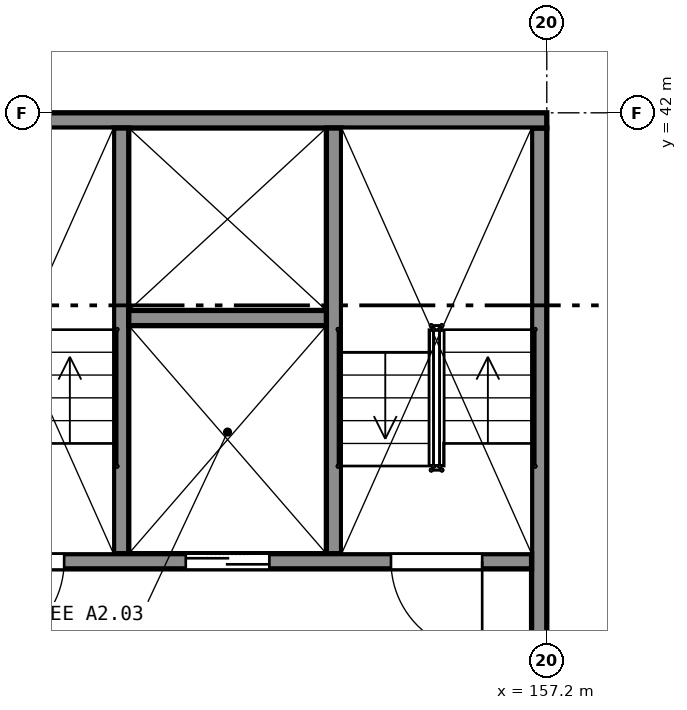
"""IFC4 building model, lengths in metres.
Left out: names, types, materials, properties, quantities, classifications, styles, units other than length and angle.
Written with IfcOpenShell. Run it as: python <this file> out.ifc"""

import sys

from ifc_helpers import new_model, si_unit, direction, frame, frame_2d, origin, place, context, subcontext, project, spatial, rectangle, extrude, element, fill, save


model = new_model("IFC4")
c1 = context("Model", 3, precision=1e-05, world=origin(), true_north=direction((0.0, 1.0)))
c2 = subcontext(c1, "Body", "Model", "MODEL_VIEW")
j1 = project(units=[si_unit("LENGTHUNIT", "METRE"), si_unit("PLANEANGLEUNIT", "RADIAN")], contexts=[c1])
p1 = place(None, origin())
s1 = spatial("IfcSite", under=j1, at=p1, CompositionType="ELEMENT")
p2 = place(p1, origin())
s2 = spatial("IfcBuilding", under=s1, at=p2, CompositionType="ELEMENT")
p3 = place(p2, frame((0.0, 0.0, 20.0)))
s3 = spatial("IfcBuildingStorey", under=s2, at=p3, CompositionType="ELEMENT", Elevation=20.0)
p4 = place(p3, frame((148.8, 41.9, 0.0), z_axis=(0.0, 0.0, 1.0), x_axis=(1.0, 0.0, 0.0)))
e1 = element("IfcWall", 1, at=p4, inside=s3, PredefinedType="SHEAR", context=c2, shape_type="SweptSolid", body=[
    extrude(rectangle(XDim=8.4, YDim=0.2, at=frame_2d((4.2, 0.0))), origin(), (0.0, 0.0, 1.0), 5.0),
])
p5 = place(p3, frame((157.1, 33.8, 0.0), z_axis=(0.0, 0.0, 1.0), x_axis=(0.0, 1.0, 0.0)))
e2 = element("IfcWall", 2, at=p5, inside=s3, PredefinedType="SHEAR", context=c2, shape_type="SweptSolid", body=[
    extrude(rectangle(XDim=8.0, YDim=0.2, at=frame_2d((4.0, 0.0))), origin(), (0.0, 0.0, 1.0), 5.0),
])
p6 = place(p3, frame((149.0, 36.1, 0.0), z_axis=(0.0, 0.0, 1.0), x_axis=(1.0, 0.0, 0.0)))
e3 = element("IfcWall", 3, at=p6, inside=s3, PredefinedType="SHEAR", context=c2, shape_type="SweptSolid", body=[
    extrude(rectangle(XDim=8.0, YDim=0.2, at=frame_2d((4.0, 0.0))), origin(), (0.0, 0.0, 1.0), 5.0),
])
p7 = place(p6, frame((0.65, 0.0, 0.0)))
e4 = element("IfcOpeningElement", 4, at=p7, cuts=e3, PredefinedType="OPENING", context=c2, shape_type="SweptSolid", body=[
    extrude(rectangle(XDim=1.2, YDim=2.1, at=frame_2d((0.6, 1.05))), frame((0.0, 0.11, 0.0), z_axis=(0.0, -1.0, 0.0), x_axis=(1.0, 0.0, 0.0)), (0.0, 0.0, 1.0), 0.22),
])
p8 = place(p6, frame((6.15, 0.0, 0.0)))
e5 = element("IfcOpeningElement", 5, at=p8, cuts=e3, PredefinedType="OPENING", context=c2, shape_type="SweptSolid", body=[
    extrude(rectangle(XDim=1.2, YDim=2.1, at=frame_2d((0.6, 1.05))), frame((0.0, 0.11, 0.0), z_axis=(0.0, -1.0, 0.0), x_axis=(1.0, 0.0, 0.0)), (0.0, 0.0, 1.0), 0.22),
])
p9 = place(p6, frame((3.45, 0.0, 0.0)))
e6 = element("IfcOpeningElement", 6, at=p9, cuts=e3, PredefinedType="OPENING", context=c2, shape_type="SweptSolid", body=[
    extrude(rectangle(XDim=1.1, YDim=2.1, at=frame_2d((0.55, 1.05))), frame((0.0, 0.11, 0.0), z_axis=(0.0, -1.0, 0.0), x_axis=(1.0, 0.0, 0.0)), (0.0, 0.0, 1.0), 0.22),
])
for number, where, z_axis, x_axis in (
    (7, (151.6, 36.2, 0.0), (0.0, 0.0, 1.0), (0.0, 1.0, 0.0)),
    (8, (154.4, 36.2, 0.0), (0.0, 0.0, 1.0), (0.0, 1.0, 0.0)),
):
    element("IfcWall", number, at=place(p3, frame(where, z_axis=z_axis, x_axis=x_axis)), inside=s3, PredefinedType="SHEAR", context=c2, shape_type="SweptSolid", body=[
        extrude(rectangle(XDim=5.6, YDim=0.2, at=frame_2d((2.8, 0.0))), origin(), (0.0, 0.0, 1.0), 5.0),
    ])
p10 = place(p3, frame((151.7, 39.3, 0.0), z_axis=(0.0, 0.0, 1.0), x_axis=(1.0, 0.0, 0.0)))
e9 = element("IfcWall", 9, at=p10, inside=s3, PredefinedType="SHEAR", context=c2, shape_type="SweptSolid", body=[
    extrude(rectangle(XDim=2.6, YDim=0.2, at=frame_2d((1.3, 0.0))), origin(), (0.0, 0.0, 1.0), 5.0),
])
p11 = place(p7, origin())
e10 = element("IfcDoor", 10, at=p11, inside=s3, OperationType="SINGLE_SWING_LEFT", PredefinedType="DOOR", context=c2, shape_type="SweptSolid", body=[
    extrude(rectangle(XDim=1.2, YDim=2.1, at=frame_2d((0.6, 1.05))), frame((0.0, 0.025, 0.0), z_axis=(0.0, -1.0, 0.0), x_axis=(1.0, 0.0, 0.0)), (0.0, 0.0, 1.0), 0.05),
])
fill(e4, e10)
p12 = place(p8, origin())
e11 = element("IfcDoor", 11, at=p12, inside=s3, OperationType="SINGLE_SWING_RIGHT", PredefinedType="DOOR", context=c2, shape_type="SweptSolid", body=[
    extrude(rectangle(XDim=1.2, YDim=2.1, at=frame_2d((0.6, 1.05))), frame((0.0, 0.025, 0.0), z_axis=(0.0, -1.0, 0.0), x_axis=(1.0, 0.0, 0.0)), (0.0, 0.0, 1.0), 0.05),
])
fill(e5, e11)
p13 = place(p9, origin())
e12 = element("IfcDoor", 12, at=p13, inside=s3, OperationType="DOUBLE_DOOR_SLIDING", PredefinedType="DOOR", context=c2, shape_type="SweptSolid", body=[
    extrude(rectangle(XDim=1.1, YDim=2.1, at=frame_2d((0.55, 1.05))), frame((0.0, 0.025, 0.0), z_axis=(0.0, -1.0, 0.0), x_axis=(1.0, 0.0, 0.0)), (0.0, 0.0, 1.0), 0.05),
])
fill(e6, e12)
save(model, sys.argv[1])
